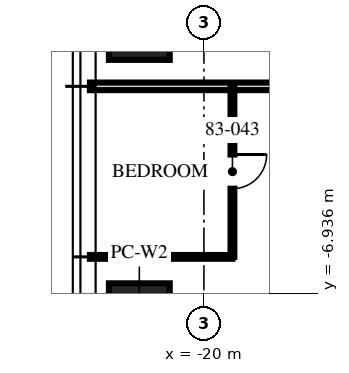
"""IFC4 building model, lengths in metres.
Left out: names, types, materials, properties, quantities, classifications, styles, units other than length and angle.
Written with IfcOpenShell. Run it as: python <this file> out.ifc"""

import sys

from ifc_helpers import new_model, si_unit, direction, frame, frame_2d, origin, origin_2d, place, context, subcontext, project, spatial, rectangle, extrude, element, fill, save


model = new_model("IFC4")
c1 = context("Model", 3, precision=1e-05, world=origin(), true_north=direction((0.0, 1.0)))
c2 = subcontext(c1, "Body", "Model", "MODEL_VIEW")
j1 = project(units=[si_unit("LENGTHUNIT", "METRE"), si_unit("PLANEANGLEUNIT", "RADIAN")], contexts=[c1])
p1 = place(None, origin())
s1 = spatial("IfcSite", under=j1, at=p1, CompositionType="ELEMENT")
p2 = place(p1, origin())
s2 = spatial("IfcBuilding", under=s1, at=p2, CompositionType="ELEMENT")
p3 = place(p2, frame((0.0, 0.0, 330.75)))
s3 = spatial("IfcBuildingStorey", under=s2, at=p3, CompositionType="ELEMENT", Elevation=330.75)
for number, where, z_axis, x_axis in (
    (1, (-21.7, -7.48, 0.0), (0.0, 0.0, 1.0), (0.0, 1.0, 0.0)),
    (2, (-21.7, 0.0, 0.0), (0.0, 0.0, 1.0), (0.0, 1.0, 0.0)),
):
    element("IfcColumn", number, at=place(p3, frame(where, z_axis=z_axis, x_axis=x_axis)), inside=s3, PredefinedType="COLUMN", context=c2, shape_type="SweptSolid", body=[
        extrude(rectangle(XDim=1.6, YDim=1.6, at=origin_2d()), origin(), (0.0, 0.0, 1.0), 3.75),
    ])
p4 = place(p3, frame((-17.95, -1.496, 0.0), z_axis=(0.0, 0.0, 1.0), x_axis=(-1.0, 0.0, 0.0)))
e3 = element("IfcWall", 3, at=p4, inside=s3, PredefinedType="PARTITIONING", context=c2, shape_type="SweptSolid", body=[
    extrude(rectangle(XDim=5.05, YDim=0.2, at=frame_2d((2.525, 0.0))), origin(), (0.0, 0.0, 1.0), 3.01),
])
p5 = place(p3, frame((-19.25, -5.984, 0.0), z_axis=(0.0, 0.0, 1.0), x_axis=(-1.0, 0.0, 0.0)))
e4 = element("IfcWall", 4, at=p5, inside=s3, PredefinedType="PARTITIONING", context=c2, shape_type="SweptSolid", body=[
    extrude(rectangle(XDim=3.75, YDim=0.1, at=frame_2d((1.875, 0.0))), origin(), (0.0, 0.0, 1.0), 3.01),
])
p6 = place(p3, frame((-19.25, -1.496, 0.0), z_axis=(0.0, 0.0, 1.0), x_axis=(0.0, -1.0, 0.0)))
e5 = element("IfcWall", 5, at=p6, inside=s3, PredefinedType="PARTITIONING", context=c2, shape_type="SweptSolid", body=[
    extrude(rectangle(XDim=4.488, YDim=0.1, at=frame_2d((2.244, 0.0))), origin(), (0.0, 0.0, 1.0), 2.91),
])
p7 = place(p6, frame((1.794, 0.0, 0.0)))
e6 = element("IfcOpeningElement", 6, at=p7, cuts=e5, PredefinedType="OPENING", context=c2, shape_type="SweptSolid", body=[
    extrude(rectangle(XDim=0.9, YDim=2.1, at=frame_2d((0.45, 1.05))), frame((0.0, 0.06, 0.0), z_axis=(0.0, -1.0, 0.0), x_axis=(1.0, 0.0, 0.0)), (0.0, 0.0, 1.0), 0.12),
])
p8 = place(p7, origin())
e7 = element("IfcDoor", 7, at=p8, inside=s3, OperationType="SINGLE_SWING_LEFT", PredefinedType="DOOR", context=c2, shape_type="SweptSolid", body=[
    extrude(rectangle(XDim=0.9, YDim=2.1, at=frame_2d((0.45, 1.05))), frame((0.0, 0.025, 0.0), z_axis=(0.0, -1.0, 0.0), x_axis=(1.0, 0.0, 0.0)), (0.0, 0.0, 1.0), 0.05),
])
fill(e6, e7)
save(model, sys.argv[1])
